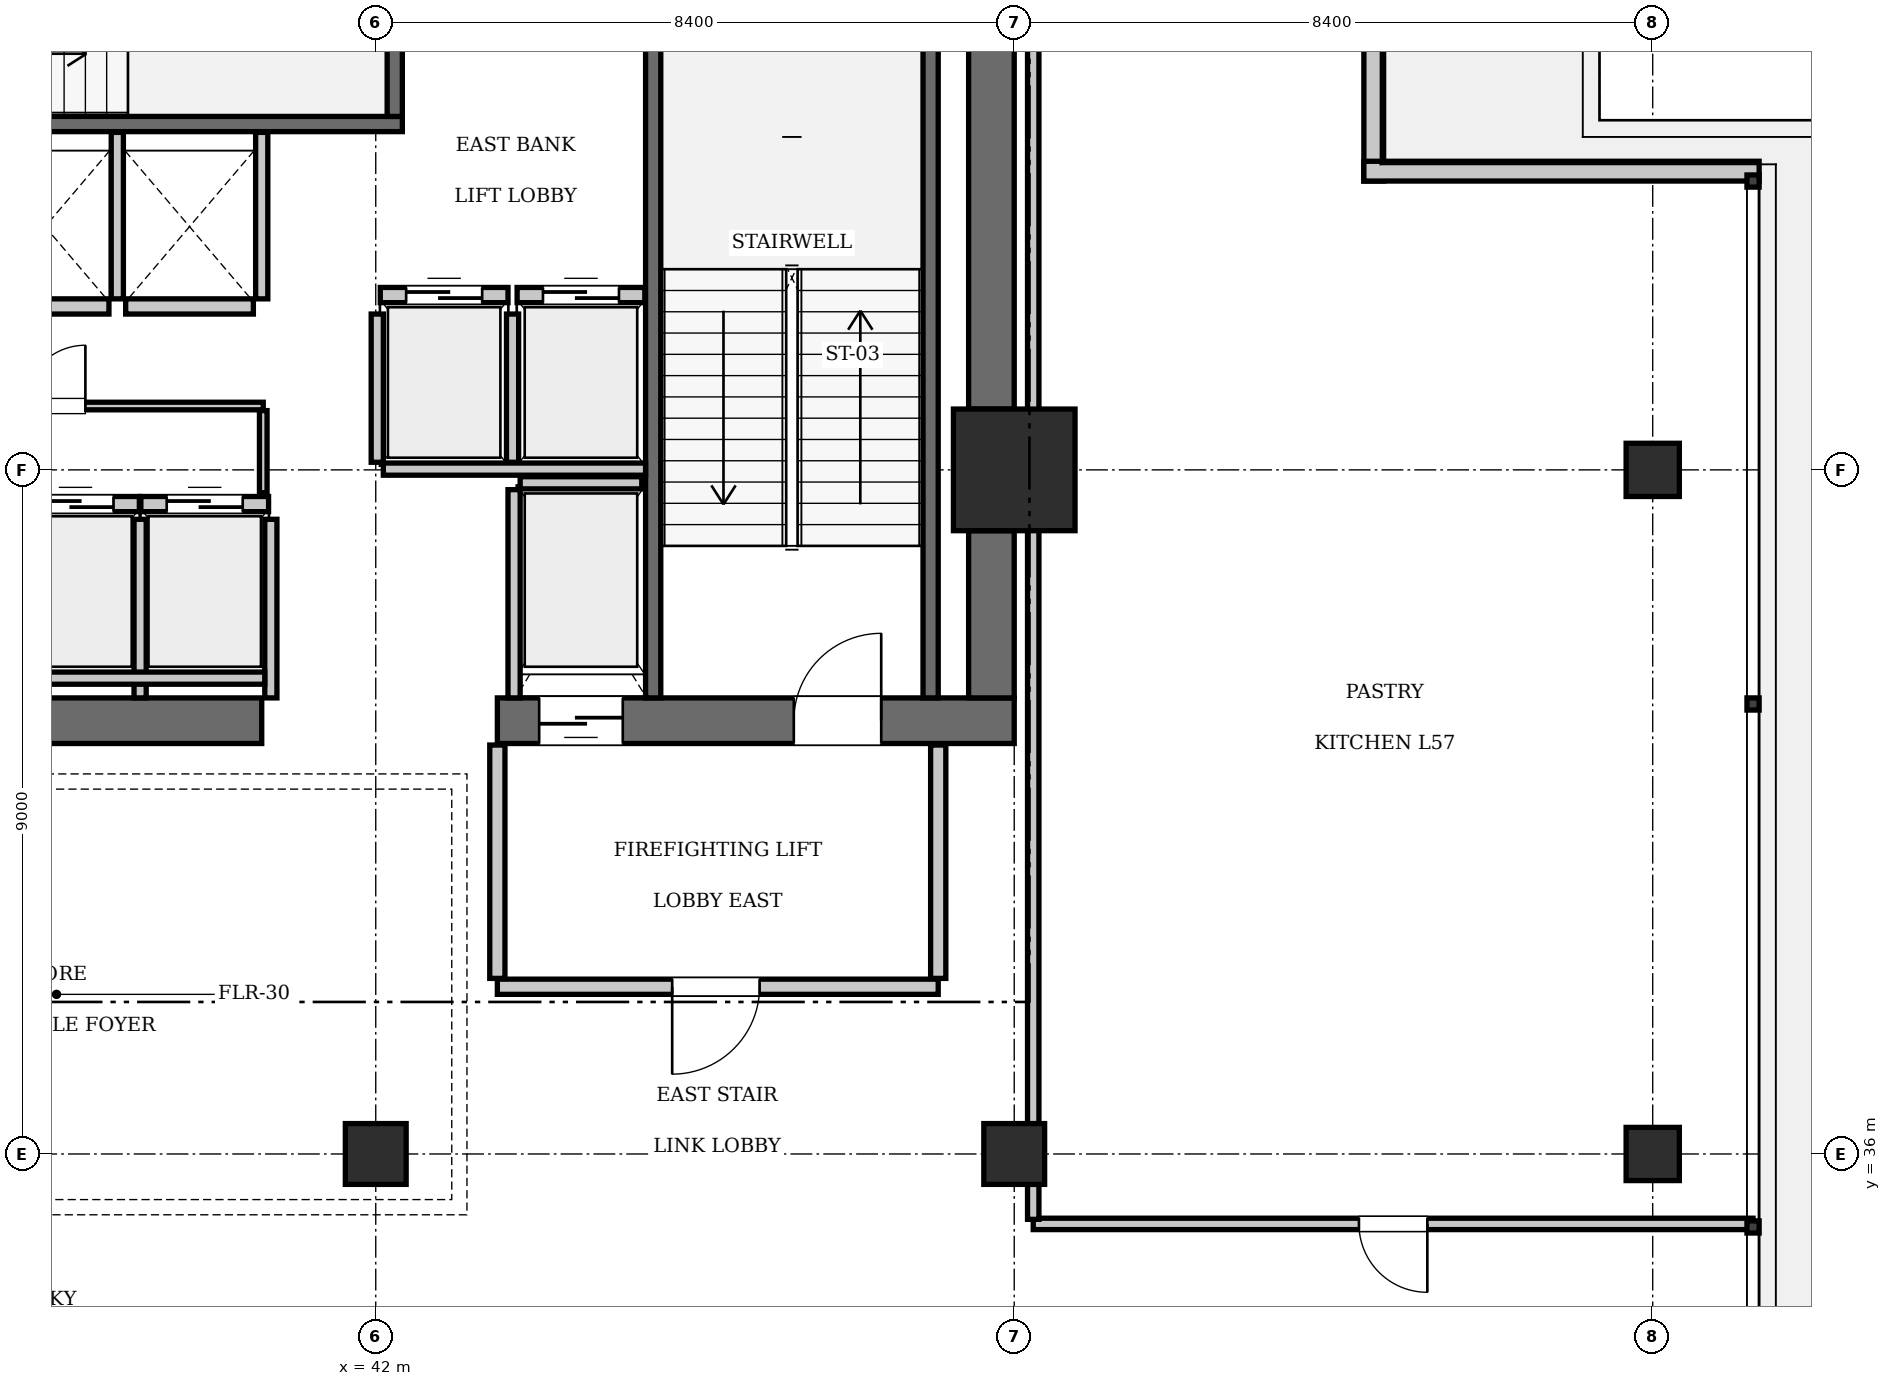
"""IFC4 building model, lengths in metres.
Left out: names, types, materials, properties, quantities, classifications, styles, units other than length and angle.
Written with IfcOpenShell. Run it as: python <this file> out.ifc"""

import sys

from ifc_helpers import new_model, si_unit, direction, frame, frame_2d, origin, origin_2d, place, context, subcontext, project, spatial, rectangle, extrude, element, fill, save


model = new_model("IFC4")
c1 = context("Model", 3, precision=1e-05, world=origin(), true_north=direction((0.0, 1.0)))
c2 = subcontext(c1, "Body", "Model", "MODEL_VIEW")
j1 = project(units=[si_unit("LENGTHUNIT", "METRE"), si_unit("PLANEANGLEUNIT", "RADIAN")], contexts=[c1])
p1 = place(None, origin())
s1 = spatial("IfcSite", under=j1, at=p1, CompositionType="ELEMENT")
p2 = place(p1, origin())
s2 = spatial("IfcBuilding", under=s1, at=p2, CompositionType="ELEMENT")
p3 = place(p2, frame((0.0, 0.0, 234.5)))
s3 = spatial("IfcBuildingStorey", under=s2, at=p3, CompositionType="ELEMENT", Elevation=234.5)
p4 = place(p3, frame((50.4, 45.0, 0.0), z_axis=(0.0, 0.0, 1.0), x_axis=(1.0, 0.0, 0.0)))
e1 = element("IfcColumn", 1, at=p4, inside=s3, PredefinedType="COLUMN", context=c2, shape_type="SweptSolid", body=[
    extrude(rectangle(XDim=1.6, YDim=1.6, at=origin_2d()), origin(), (0.0, 0.0, 1.0), 4.9),
])
p5 = place(p3, frame((35.1, 41.7, 0.0), z_axis=(0.0, 0.0, 1.0), x_axis=(1.0, 0.0, 0.0)))
e2 = element("IfcWall", 2, at=p5, inside=s3, PredefinedType="SHEAR", context=c2, shape_type="SweptSolid", body=[
    extrude(rectangle(XDim=5.4, YDim=0.6, at=frame_2d((2.7, 0.0))), origin(), (0.0, 0.0, 1.0), 4.9),
])
p6 = place(p3, frame((43.6, 41.7, 0.0), z_axis=(0.0, 0.0, 1.0), x_axis=(1.0, 0.0, 0.0)))
e3 = element("IfcWall", 3, at=p6, inside=s3, PredefinedType="SHEAR", context=c2, shape_type="SweptSolid", body=[
    extrude(rectangle(XDim=6.8, YDim=0.6, at=frame_2d((3.4, 0.0))), origin(), (0.0, 0.0, 1.0), 4.9),
])
p7 = place(p6, frame((3.9, 0.0, 0.0)))
e4 = element("IfcOpeningElement", 4, at=p7, cuts=e3, PredefinedType="OPENING", context=c2, shape_type="SweptSolid", body=[
    extrude(rectangle(XDim=1.15, YDim=2.15, at=frame_2d((0.575, 1.075))), frame((0.0, 0.31, 0.0), z_axis=(0.0, -1.0, 0.0), x_axis=(1.0, 0.0, 0.0)), (0.0, 0.0, 1.0), 0.62),
])
p8 = place(p6, frame((0.55, 0.0, 0.0)))
e5 = element("IfcOpeningElement", 5, at=p8, cuts=e3, PredefinedType="OPENING", context=c2, shape_type="SweptSolid", body=[
    extrude(rectangle(XDim=1.1, YDim=2.2, at=frame_2d((0.55, 1.1))), frame((0.0, 0.31, 0.0), z_axis=(0.0, -1.0, 0.0), x_axis=(1.0, 0.0, 0.0)), (0.0, 0.0, 1.0), 0.62),
])
p9 = place(p3, frame((50.1, 42.0, 0.0), z_axis=(0.0, 0.0, 1.0), x_axis=(0.0, 1.0, 0.0)))
e6 = element("IfcWall", 6, at=p9, inside=s3, PredefinedType="SHEAR", context=c2, shape_type="SweptSolid", body=[
    extrude(rectangle(XDim=2.2, YDim=0.6, at=frame_2d((1.1, 0.0))), origin(), (0.0, 0.0, 1.0), 4.9),
])
p10 = place(p3, frame((50.1, 45.8, 0.0), z_axis=(0.0, 0.0, 1.0), x_axis=(0.0, 1.0, 0.0)))
e7 = element("IfcWall", 7, at=p10, inside=s3, PredefinedType="SHEAR", context=c2, shape_type="SweptSolid", body=[
    extrude(rectangle(XDim=7.6, YDim=0.6, at=frame_2d((3.8, 0.0))), origin(), (0.0, 0.0, 1.0), 4.9),
])
for number, where, z_axis, x_axis in (
    (8, (42.0, 36.0, 0.0), (0.0, 0.0, 1.0), (1.0, 0.0, 0.0)),
    (9, (50.4, 36.0, 0.0), (0.0, 0.0, 1.0), (1.0, 0.0, 0.0)),
):
    element("IfcColumn", number, at=place(p3, frame(where, z_axis=z_axis, x_axis=x_axis)), inside=s3, PredefinedType="COLUMN", context=c2, shape_type="SweptSolid", body=[
        extrude(rectangle(XDim=0.8, YDim=0.8, at=origin_2d()), origin(), (0.0, 0.0, 1.0), 4.9),
    ])
for number, where, z_axis, x_axis in (
    (10, (58.8, 36.0, 0.0), (0.0, 0.0, 1.0), (1.0, 0.0, 0.0)),
    (11, (58.8, 45.0, 0.0), (0.0, 0.0, 1.0), (1.0, 0.0, 0.0)),
):
    element("IfcColumn", number, at=place(p3, frame(where, z_axis=z_axis, x_axis=x_axis)), inside=s3, PredefinedType="COLUMN", context=c2, shape_type="SweptSolid", body=[
        extrude(rectangle(XDim=0.7, YDim=0.7, at=origin_2d()), origin(), (0.0, 0.0, 1.0), 4.9),
    ])
p11 = place(p3, frame((33.25, 49.55, 0.0), z_axis=(0.0, 0.0, 1.0), x_axis=(1.0, 0.0, 0.0)))
e12 = element("IfcWall", 12, at=p11, inside=s3, PredefinedType="SOLIDWALL", context=c2, shape_type="SweptSolid", body=[
    extrude(rectangle(XDim=9.1, YDim=0.2, at=frame_2d((4.55, 0.0))), origin(), (0.0, 0.0, 1.0), 4.66),
])
p12 = place(p3, frame((42.25, 49.65, 0.0), z_axis=(0.0, 0.0, 1.0), x_axis=(0.0, 1.0, 0.0)))
e13 = element("IfcWall", 13, at=p12, inside=s3, PredefinedType="SOLIDWALL", context=c2, shape_type="SweptSolid", body=[
    extrude(rectangle(XDim=3.75, YDim=0.2, at=frame_2d((1.875, 0.0))), origin(), (0.0, 0.0, 1.0), 4.66),
])
p13 = place(p3, frame((45.65, 42.0, 0.0), z_axis=(0.0, 0.0, 1.0), x_axis=(0.0, 1.0, 0.0)))
e14 = element("IfcWall", 14, at=p13, inside=s3, PredefinedType="SOLIDWALL", context=c2, shape_type="SweptSolid", body=[
    extrude(rectangle(XDim=9.15, YDim=0.2, at=frame_2d((4.575, 0.0))), origin(), (0.0, 0.0, 1.0), 4.66),
])
p14 = place(p3, frame((49.3, 42.0, 0.0), z_axis=(0.0, 0.0, 1.0), x_axis=(0.0, 1.0, 0.0)))
e15 = element("IfcWall", 15, at=p14, inside=s3, PredefinedType="SOLIDWALL", context=c2, shape_type="SweptSolid", body=[
    extrude(rectangle(XDim=9.12, YDim=0.2, at=frame_2d((4.56, 0.0))), origin(), (0.0, 0.0, 1.0), 4.66),
])
p15 = place(p3, frame((42.06, 47.3, 0.0), z_axis=(0.0, 0.0, 1.0), x_axis=(1.0, 0.0, 0.0)))
e16 = element("IfcWall", 16, at=p15, inside=s3, PredefinedType="SOLIDWALL", context=c2, shape_type="SweptSolid", body=[
    extrude(rectangle(XDim=1.68, YDim=0.2, at=frame_2d((0.84, 0.0))), origin(), (0.0, 0.0, 1.0), 4.66),
])
p16 = place(p15, frame((0.34, 0.0, 0.0)))
e17 = element("IfcOpeningElement", 17, at=p16, cuts=e16, PredefinedType="OPENING", context=c2, shape_type="SweptSolid", body=[
    extrude(rectangle(XDim=1.0, YDim=2.15, at=frame_2d((0.5, 1.075))), frame((0.0, 0.11, 0.0), z_axis=(0.0, -1.0, 0.0), x_axis=(1.0, 0.0, 0.0)), (0.0, 0.0, 1.0), 0.22),
])
p17 = place(p3, frame((43.86, 47.3, 0.0), z_axis=(0.0, 0.0, 1.0), x_axis=(1.0, 0.0, 0.0)))
e18 = element("IfcWall", 18, at=p17, inside=s3, PredefinedType="SOLIDWALL", context=c2, shape_type="SweptSolid", body=[
    extrude(rectangle(XDim=1.68, YDim=0.2, at=frame_2d((0.84, 0.0))), origin(), (0.0, 0.0, 1.0), 4.66),
])
p18 = place(p17, frame((0.34, 0.0, 0.0)))
e19 = element("IfcOpeningElement", 19, at=p18, cuts=e18, PredefinedType="OPENING", context=c2, shape_type="SweptSolid", body=[
    extrude(rectangle(XDim=1.0, YDim=2.15, at=frame_2d((0.5, 1.075))), frame((0.0, 0.11, 0.0), z_axis=(0.0, -1.0, 0.0), x_axis=(1.0, 0.0, 0.0)), (0.0, 0.0, 1.0), 0.22),
])
p19 = place(p3, frame((37.21, 44.55, 0.0), z_axis=(0.0, 0.0, 1.0), x_axis=(1.0, 0.0, 0.0)))
e20 = element("IfcWall", 20, at=p19, inside=s3, PredefinedType="SOLIDWALL", context=c2, shape_type="SweptSolid", body=[
    extrude(rectangle(XDim=1.68, YDim=0.2, at=frame_2d((0.84, 0.0))), origin(), (0.0, 0.0, 1.0), 4.66),
])
p20 = place(p19, frame((0.34, 0.0, 0.0)))
e21 = element("IfcOpeningElement", 21, at=p20, cuts=e20, PredefinedType="OPENING", context=c2, shape_type="SweptSolid", body=[
    extrude(rectangle(XDim=1.0, YDim=2.15, at=frame_2d((0.5, 1.075))), frame((0.0, 0.11, 0.0), z_axis=(0.0, -1.0, 0.0), x_axis=(1.0, 0.0, 0.0)), (0.0, 0.0, 1.0), 0.22),
])
p21 = place(p3, frame((38.91, 44.55, 0.0), z_axis=(0.0, 0.0, 1.0), x_axis=(1.0, 0.0, 0.0)))
e22 = element("IfcWall", 22, at=p21, inside=s3, PredefinedType="SOLIDWALL", context=c2, shape_type="SweptSolid", body=[
    extrude(rectangle(XDim=1.68, YDim=0.2, at=frame_2d((0.84, 0.0))), origin(), (0.0, 0.0, 1.0), 4.66),
])
p22 = place(p21, frame((0.34, 0.0, 0.0)))
e23 = element("IfcOpeningElement", 23, at=p22, cuts=e22, PredefinedType="OPENING", context=c2, shape_type="SweptSolid", body=[
    extrude(rectangle(XDim=1.0, YDim=2.15, at=frame_2d((0.5, 1.075))), frame((0.0, 0.11, 0.0), z_axis=(0.0, -1.0, 0.0), x_axis=(1.0, 0.0, 0.0)), (0.0, 0.0, 1.0), 0.22),
])
for number, where, z_axis, x_axis in (
    (24, (36.81, 47.15, 0.0), (0.0, 0.0, 1.0), (1.0, 0.0, 0.0)),
    (25, (38.71, 47.15, 0.0), (0.0, 0.0, 1.0), (1.0, 0.0, 0.0)),
):
    element("IfcWall", number, at=place(p3, frame(where, z_axis=z_axis, x_axis=x_axis)), inside=s3, PredefinedType="SOLIDWALL", context=c2, shape_type="SweptSolid", body=[
        extrude(rectangle(XDim=1.68, YDim=0.2, at=frame_2d((0.84, 0.0))), origin(), (0.0, 0.0, 1.0), 4.66),
    ])
p23 = place(p3, frame((43.9, 44.83, 0.0), z_axis=(0.0, 0.0, 1.0), x_axis=(1.0, 0.0, 0.0)))
e26 = element("IfcWall", 26, at=p23, inside=s3, PredefinedType="SOLIDWALL", context=c2, shape_type="SweptSolid", body=[
    extrude(rectangle(XDim=1.6, YDim=0.16, at=frame_2d((0.8, 0.0))), origin(), (0.0, 0.0, 1.0), 4.66),
])
p24 = place(p3, frame((43.82, 42.0, 0.0), z_axis=(0.0, 0.0, 1.0), x_axis=(0.0, 1.0, 0.0)))
e27 = element("IfcWall", 27, at=p24, inside=s3, PredefinedType="SOLIDWALL", context=c2, shape_type="SweptSolid", body=[
    extrude(rectangle(XDim=2.74, YDim=0.16, at=frame_2d((1.37, 0.0))), origin(), (0.0, 0.0, 1.0), 4.66),
])
for number, where, z_axis, x_axis in (
    (28, (42.02, 45.1, 0.0), (0.0, 0.0, 1.0), (0.0, 1.0, 0.0)),
    (29, (43.8, 45.1, 0.0), (0.0, 0.0, 1.0), (0.0, 1.0, 0.0)),
):
    element("IfcWall", number, at=place(p3, frame(where, z_axis=z_axis, x_axis=x_axis)), inside=s3, PredefinedType="SOLIDWALL", context=c2, shape_type="SweptSolid", body=[
        extrude(rectangle(XDim=1.95, YDim=0.16, at=frame_2d((0.975, 0.0))), origin(), (0.0, 0.0, 1.0), 4.66),
    ])
p25 = place(p3, frame((42.1, 45.01, 0.0), z_axis=(0.0, 0.0, 1.0), x_axis=(1.0, 0.0, 0.0)))
e30 = element("IfcWall", 30, at=p25, inside=s3, PredefinedType="SOLIDWALL", context=c2, shape_type="SweptSolid", body=[
    extrude(rectangle(XDim=3.45, YDim=0.16, at=frame_2d((1.725, 0.0))), origin(), (0.0, 0.0, 1.0), 4.66),
])
for number, where, z_axis, x_axis in (
    (31, (38.9, 42.0, 0.0), (0.0, 0.0, 1.0), (0.0, 1.0, 0.0)),
    (32, (40.62, 42.0, 0.0), (0.0, 0.0, 1.0), (0.0, 1.0, 0.0)),
):
    element("IfcWall", number, at=place(p3, frame(where, z_axis=z_axis, x_axis=x_axis)), inside=s3, PredefinedType="SOLIDWALL", context=c2, shape_type="SweptSolid", body=[
        extrude(rectangle(XDim=2.35, YDim=0.16, at=frame_2d((1.175, 0.0))), origin(), (0.0, 0.0, 1.0), 4.66),
    ])
p26 = place(p3, frame((35.52, 42.26, 0.0), z_axis=(0.0, 0.0, 1.0), x_axis=(1.0, 0.0, 0.0)))
e33 = element("IfcWall", 33, at=p26, inside=s3, PredefinedType="SOLIDWALL", context=c2, shape_type="SweptSolid", body=[
    extrude(rectangle(XDim=5.02, YDim=0.16, at=frame_2d((2.51, 0.0))), origin(), (0.0, 0.0, 1.0), 4.66),
])
for number, where, z_axis, x_axis in (
    (34, (38.6, 47.25, 0.0), (0.0, 0.0, 1.0), (0.0, 1.0, 0.0)),
    (35, (40.5, 47.25, 0.0), (0.0, 0.0, 1.0), (0.0, 1.0, 0.0)),
):
    element("IfcWall", number, at=place(p3, frame(where, z_axis=z_axis, x_axis=x_axis)), inside=s3, PredefinedType="SOLIDWALL", context=c2, shape_type="SweptSolid", body=[
        extrude(rectangle(XDim=2.19, YDim=0.16, at=frame_2d((1.095, 0.0))), origin(), (0.0, 0.0, 1.0), 4.66),
    ])
for number, where, z_axis, x_axis in (
    (36, (55.13, 54.0, 0.0), (0.0, 0.0, 1.0), (0.0, -1.0, 0.0)),
    (37, (55.0, 48.93, 0.0), (0.0, 0.0, 1.0), (1.0, 0.0, 0.0)),
):
    element("IfcWall", number, at=place(p3, frame(where, z_axis=z_axis, x_axis=x_axis)), inside=s3, PredefinedType="SOLIDWALL", context=c2, shape_type="SweptSolid", body=[
        extrude(rectangle(XDim=5.2, YDim=0.26, at=frame_2d((2.6, 0.0))), origin(), (0.0, 0.0, 1.0), 4.66),
    ])
p27 = place(p3, frame((43.6, 38.2, 0.0), z_axis=(0.0, 0.0, 1.0), x_axis=(1.0, 0.0, 0.0)))
e38 = element("IfcWall", 38, at=p27, inside=s3, PredefinedType="PARTITIONING", context=c2, shape_type="SweptSolid", body=[
    extrude(rectangle(XDim=5.8, YDim=0.2, at=frame_2d((2.9, 0.0))), origin(), (0.0, 0.0, 1.0), 4.66),
])
p28 = place(p27, frame((2.3, 0.0, 0.0)))
e39 = element("IfcOpeningElement", 39, at=p28, cuts=e38, PredefinedType="OPENING", context=c2, shape_type="SweptSolid", body=[
    extrude(rectangle(XDim=1.15, YDim=2.15, at=frame_2d((0.575, 1.075))), frame((0.0, 0.11, 0.0), z_axis=(0.0, -1.0, 0.0), x_axis=(1.0, 0.0, 0.0)), (0.0, 0.0, 1.0), 0.22),
])
for number, where, z_axis, x_axis in (
    (40, (43.6, 38.31, 0.0), (0.0, 0.0, 1.0), (0.0, 1.0, 0.0)),
    (41, (49.4, 38.31, 0.0), (0.0, 0.0, 1.0), (0.0, 1.0, 0.0)),
):
    element("IfcWall", number, at=place(p3, frame(where, z_axis=z_axis, x_axis=x_axis)), inside=s3, PredefinedType="PARTITIONING", context=c2, shape_type="SweptSolid", body=[
        extrude(rectangle(XDim=3.07, YDim=0.2, at=frame_2d((1.535, 0.0))), origin(), (0.0, 0.0, 1.0), 4.66),
    ])
p29 = place(p3, frame((35.58, 45.84, 0.0), z_axis=(0.0, 0.0, 1.0), x_axis=(1.0, 0.0, 0.0)))
e42 = element("IfcWall", 42, at=p29, inside=s3, PredefinedType="PARTITIONING", context=c2, shape_type="SweptSolid", body=[
    extrude(rectangle(XDim=4.94, YDim=0.1, at=frame_2d((2.47, 0.0))), origin(), (0.0, 0.0, 1.0), 4.66),
])
p30 = place(p29, frame((1.8, 0.0, 0.0)))
e43 = element("IfcOpeningElement", 43, at=p30, cuts=e42, PredefinedType="OPENING", context=c2, shape_type="SweptSolid", body=[
    extrude(rectangle(XDim=0.8, YDim=2.05, at=frame_2d((0.4, 1.025))), frame((0.0, 0.06, 0.0), z_axis=(0.0, -1.0, 0.0), x_axis=(1.0, 0.0, 0.0)), (0.0, 0.0, 1.0), 0.12),
])
p31 = place(p3, frame((40.52, 44.7, 0.0), z_axis=(0.0, 0.0, 1.0), x_axis=(0.0, 1.0, 0.0)))
e44 = element("IfcWall", 44, at=p31, inside=s3, PredefinedType="PARTITIONING", context=c2, shape_type="SweptSolid", body=[
    extrude(rectangle(XDim=1.08, YDim=0.1, at=frame_2d((0.54, 0.0))), origin(), (0.0, 0.0, 1.0), 4.66),
])
p32 = place(p3, frame((50.65, 35.08, 0.0), z_axis=(0.0, 0.0, 1.0), x_axis=(1.0, 0.0, 0.0)))
e45 = element("IfcWall", 45, at=p32, inside=s3, PredefinedType="PARTITIONING", context=c2, shape_type="SweptSolid", body=[
    extrude(rectangle(XDim=9.47, YDim=0.15, at=frame_2d((4.735, 0.0))), origin(), (0.0, 0.0, 1.0), 4.66),
])
p33 = place(p32, frame((4.285, 0.0, 0.0)))
e46 = element("IfcOpeningElement", 46, at=p33, cuts=e45, PredefinedType="OPENING", context=c2, shape_type="SweptSolid", body=[
    extrude(rectangle(XDim=0.9, YDim=2.1, at=frame_2d((0.45, 1.05))), frame((0.0, 0.085, 0.0), z_axis=(0.0, -1.0, 0.0), x_axis=(1.0, 0.0, 0.0)), (0.0, 0.0, 1.0), 0.17),
])
p34 = place(p3, frame((50.65, 35.14, 0.0), z_axis=(0.0, 0.0, 1.0), x_axis=(0.0, 1.0, 0.0)))
e47 = element("IfcWall", 47, at=p34, inside=s3, PredefinedType="PARTITIONING", context=c2, shape_type="SweptSolid", body=[
    extrude(rectangle(XDim=18.78, YDim=0.15, at=frame_2d((9.39, 0.0))), origin(), (0.0, 0.0, 1.0), 4.66),
])
p35 = place(p7, origin())
e48 = element("IfcDoor", 48, at=p35, inside=s3, OperationType="SINGLE_SWING_RIGHT", PredefinedType="DOOR", context=c2, shape_type="SweptSolid", body=[
    extrude(rectangle(XDim=1.15, YDim=2.15, at=frame_2d((0.575, 1.075))), frame((0.0, 0.025, 0.0), z_axis=(0.0, -1.0, 0.0), x_axis=(1.0, 0.0, 0.0)), (0.0, 0.0, 1.0), 0.05),
])
fill(e4, e48)
p36 = place(p16, origin())
e49 = element("IfcDoor", 49, at=p36, inside=s3, OperationType="SLIDING_TO_LEFT", PredefinedType="DOOR", context=c2, shape_type="SweptSolid", body=[
    extrude(rectangle(XDim=1.0, YDim=2.15, at=frame_2d((0.5, 1.075))), frame((0.0, 0.025, 0.0), z_axis=(0.0, -1.0, 0.0), x_axis=(1.0, 0.0, 0.0)), (0.0, 0.0, 1.0), 0.05),
])
fill(e17, e49)
p37 = place(p18, origin())
e50 = element("IfcDoor", 50, at=p37, inside=s3, OperationType="SLIDING_TO_LEFT", PredefinedType="DOOR", context=c2, shape_type="SweptSolid", body=[
    extrude(rectangle(XDim=1.0, YDim=2.15, at=frame_2d((0.5, 1.075))), frame((0.0, 0.025, 0.0), z_axis=(0.0, -1.0, 0.0), x_axis=(1.0, 0.0, 0.0)), (0.0, 0.0, 1.0), 0.05),
])
fill(e19, e50)
p38 = place(p20, origin())
e51 = element("IfcDoor", 51, at=p38, inside=s3, OperationType="SLIDING_TO_LEFT", PredefinedType="DOOR", context=c2, shape_type="SweptSolid", body=[
    extrude(rectangle(XDim=1.0, YDim=2.15, at=frame_2d((0.5, 1.075))), frame((0.0, 0.025, 0.0), z_axis=(0.0, -1.0, 0.0), x_axis=(1.0, 0.0, 0.0)), (0.0, 0.0, 1.0), 0.05),
])
fill(e21, e51)
p39 = place(p22, origin())
e52 = element("IfcDoor", 52, at=p39, inside=s3, OperationType="SLIDING_TO_LEFT", PredefinedType="DOOR", context=c2, shape_type="SweptSolid", body=[
    extrude(rectangle(XDim=1.0, YDim=2.15, at=frame_2d((0.5, 1.075))), frame((0.0, 0.025, 0.0), z_axis=(0.0, -1.0, 0.0), x_axis=(1.0, 0.0, 0.0)), (0.0, 0.0, 1.0), 0.05),
])
fill(e23, e52)
p40 = place(p8, frame((1.1, 0.0, 0.0), z_axis=(0.0, 0.0, 1.0), x_axis=(-1.0, 0.0, 0.0)))
e53 = element("IfcDoor", 53, at=p40, inside=s3, OperationType="SLIDING_TO_LEFT", PredefinedType="DOOR", context=c2, shape_type="SweptSolid", body=[
    extrude(rectangle(XDim=1.1, YDim=2.2, at=frame_2d((0.55, 1.1))), frame((0.0, 0.025, 0.0), z_axis=(0.0, -1.0, 0.0), x_axis=(1.0, 0.0, 0.0)), (0.0, 0.0, 1.0), 0.05),
])
fill(e5, e53)
p41 = place(p28, frame((1.15, 0.0, 0.0), z_axis=(0.0, 0.0, 1.0), x_axis=(-1.0, 0.0, 0.0)))
e54 = element("IfcDoor", 54, at=p41, inside=s3, OperationType="SINGLE_SWING_RIGHT", PredefinedType="DOOR", context=c2, shape_type="SweptSolid", body=[
    extrude(rectangle(XDim=1.15, YDim=2.15, at=frame_2d((0.575, 1.075))), frame((0.0, 0.025, 0.0), z_axis=(0.0, -1.0, 0.0), x_axis=(1.0, 0.0, 0.0)), (0.0, 0.0, 1.0), 0.05),
])
fill(e39, e54)
p42 = place(p30, origin())
e55 = element("IfcDoor", 55, at=p42, inside=s3, OperationType="SINGLE_SWING_RIGHT", PredefinedType="DOOR", context=c2, shape_type="SweptSolid", body=[
    extrude(rectangle(XDim=0.8, YDim=2.05, at=frame_2d((0.4, 1.025))), frame((0.0, 0.025, 0.0), z_axis=(0.0, -1.0, 0.0), x_axis=(1.0, 0.0, 0.0)), (0.0, 0.0, 1.0), 0.05),
])
fill(e43, e55)
p43 = place(p33, frame((0.9, 0.0, 0.0), z_axis=(0.0, 0.0, 1.0), x_axis=(-1.0, 0.0, 0.0)))
e56 = element("IfcDoor", 56, at=p43, inside=s3, OperationType="SINGLE_SWING_LEFT", PredefinedType="DOOR", context=c2, shape_type="SweptSolid", body=[
    extrude(rectangle(XDim=0.9, YDim=2.1, at=frame_2d((0.45, 1.05))), frame((0.0, 0.025, 0.0), z_axis=(0.0, -1.0, 0.0), x_axis=(1.0, 0.0, 0.0)), (0.0, 0.0, 1.0), 0.05),
])
fill(e46, e56)
save(model, sys.argv[1])
